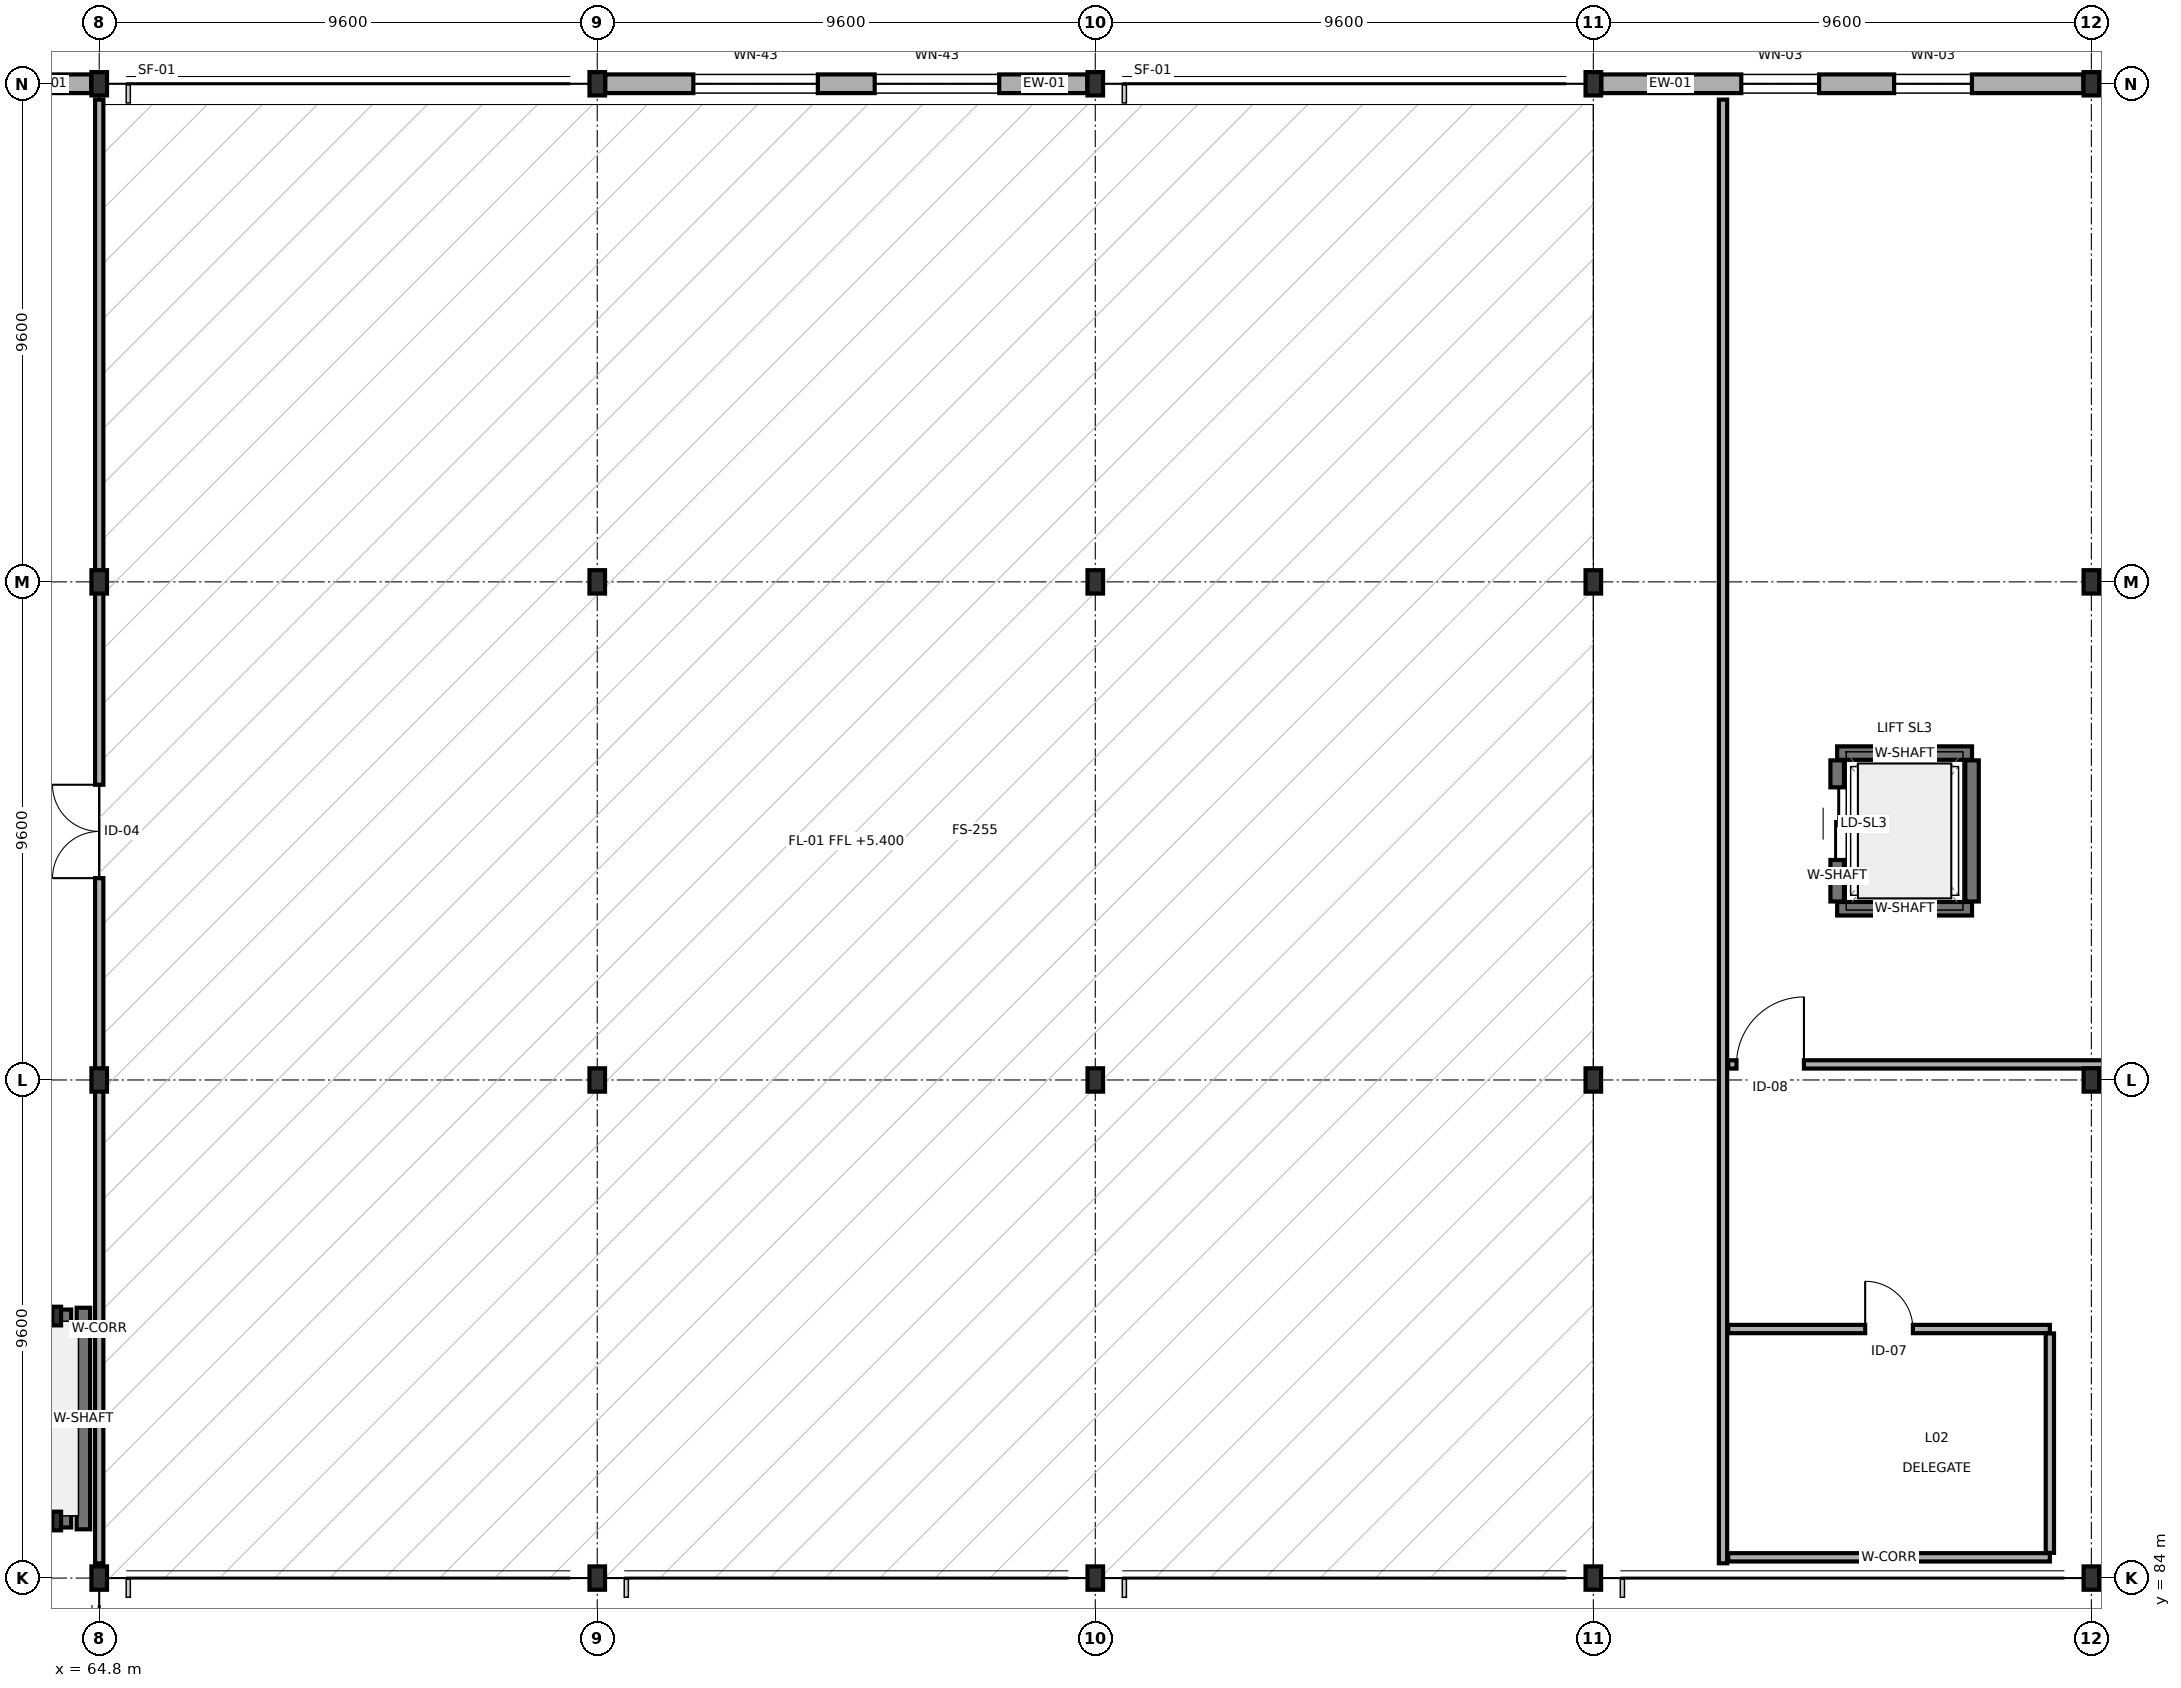
"""IFC4 building model, lengths in metres.
Left out: names, types, materials, properties, quantities, classifications, styles, units other than length and angle.
Written with IfcOpenShell. Run it as: python <this file> out.ifc"""

import sys

from ifc_helpers import new_model, si_unit, direction, frame, frame_2d, origin, origin_2d, place, context, subcontext, project, spatial, rectangle, i_section, extrude, element, fill, save


model = new_model("IFC4")
c1 = context("Model", 3, precision=1e-05, world=origin(), true_north=direction((0.0, 1.0)))
c2 = subcontext(c1, "Body", "Model", "MODEL_VIEW")
j1 = project(units=[si_unit("LENGTHUNIT", "METRE"), si_unit("PLANEANGLEUNIT", "RADIAN")], contexts=[c1])
p1 = place(None, origin())
s1 = spatial("IfcSite", under=j1, at=p1, CompositionType="ELEMENT")
p2 = place(p1, origin())
s2 = spatial("IfcBuilding", under=s1, at=p2, CompositionType="ELEMENT")
p3 = place(p2, frame((0.0, 0.0, 5.4)))
s3 = spatial("IfcBuildingStorey", under=s2, at=p3, CompositionType="ELEMENT", Elevation=5.4)
for number, where, z_axis, x_axis in (
    (1, (64.8, 84.0, 0.0), (0.0, 0.0, 1.0), (1.0, 0.0, 0.0)),
    (2, (64.8, 93.6, 0.0), (0.0, 0.0, 1.0), (1.0, 0.0, 0.0)),
    (3, (64.8, 103.2, 0.0), (0.0, 0.0, 1.0), (1.0, 0.0, 0.0)),
    (4, (64.8, 112.8, 0.0), (0.0, 0.0, 1.0), (1.0, 0.0, 0.0)),
    (5, (74.4, 84.0, 0.0), (0.0, 0.0, 1.0), (1.0, 0.0, 0.0)),
    (6, (74.4, 93.6, 0.0), (0.0, 0.0, 1.0), (1.0, 0.0, 0.0)),
    (7, (74.4, 103.2, 0.0), (0.0, 0.0, 1.0), (1.0, 0.0, 0.0)),
    (8, (74.4, 112.8, 0.0), (0.0, 0.0, 1.0), (1.0, 0.0, 0.0)),
    (9, (84.0, 84.0, 0.0), (0.0, 0.0, 1.0), (1.0, 0.0, 0.0)),
    (10, (84.0, 93.6, 0.0), (0.0, 0.0, 1.0), (1.0, 0.0, 0.0)),
    (11, (84.0, 103.2, 0.0), (0.0, 0.0, 1.0), (1.0, 0.0, 0.0)),
    (12, (84.0, 112.8, 0.0), (0.0, 0.0, 1.0), (1.0, 0.0, 0.0)),
    (13, (93.6, 84.0, 0.0), (0.0, 0.0, 1.0), (1.0, 0.0, 0.0)),
    (14, (93.6, 93.6, 0.0), (0.0, 0.0, 1.0), (1.0, 0.0, 0.0)),
    (15, (93.6, 103.2, 0.0), (0.0, 0.0, 1.0), (1.0, 0.0, 0.0)),
    (16, (93.6, 112.8, 0.0), (0.0, 0.0, 1.0), (1.0, 0.0, 0.0)),
    (17, (103.2, 84.0, 0.0), (0.0, 0.0, 1.0), (1.0, 0.0, 0.0)),
    (18, (103.2, 93.6, 0.0), (0.0, 0.0, 1.0), (1.0, 0.0, 0.0)),
    (19, (103.2, 103.2, 0.0), (0.0, 0.0, 1.0), (1.0, 0.0, 0.0)),
    (20, (103.2, 112.8, 0.0), (0.0, 0.0, 1.0), (1.0, 0.0, 0.0)),
):
    element("IfcColumn", number, at=place(p3, frame(where, z_axis=z_axis, x_axis=x_axis)), inside=s3, PredefinedType="COLUMN", context=c2, shape_type="SweptSolid", body=[
        extrude(i_section(OverallWidth=0.3, OverallDepth=0.45, WebThickness=0.014, FlangeThickness=0.026, FilletRadius=0.027, at=origin_2d()), origin(), (0.0, 0.0, 1.0), 4.5),
    ])
for number, where, z_axis, x_axis in (
    (21, (63.98, 85.1, 0.0), (0.0, 0.0, 1.0), (1.0, 0.0, 0.0)),
    (22, (63.98, 89.05, 0.0), (0.0, 0.0, 1.0), (1.0, 0.0, 0.0)),
):
    element("IfcColumn", number, at=place(p3, frame(where, z_axis=z_axis, x_axis=x_axis)), inside=s3, PredefinedType="PILASTER", context=c2, shape_type="SweptSolid", body=[
        extrude(i_section(OverallWidth=0.17, OverallDepth=0.36, WebThickness=0.008, FlangeThickness=0.013, FilletRadius=0.018, at=origin_2d()), origin(), (0.0, 0.0, 1.0), 4.5),
    ])
p4 = place(p3, frame((55.354, 112.8, 0.0), z_axis=(0.0, 0.0, 1.0), x_axis=(1.0, 0.0, 0.0)))
e23 = element("IfcWall", 23, at=p4, inside=s3, PredefinedType="SOLIDWALL", context=c2, shape_type="SweptSolid", body=[
    extrude(rectangle(XDim=9.292, YDim=0.36, at=frame_2d((4.646, 0.0))), origin(), (0.0, 0.0, 1.0), 3.685),
])
p5 = place(p4, frame((1.798, 0.0, 0.75)))
e24 = element("IfcOpeningElement", 24, at=p5, cuts=e23, PredefinedType="OPENING", context=c2, shape_type="SweptSolid", body=[
    extrude(rectangle(XDim=2.2, YDim=2.3, at=frame_2d((1.1, 1.15))), frame((0.0, 0.19, 0.0), z_axis=(0.0, -1.0, 0.0), x_axis=(1.0, 0.0, 0.0)), (0.0, 0.0, 1.0), 0.38),
])
p6 = place(p4, frame((5.294, 0.0, 0.75)))
e25 = element("IfcOpeningElement", 25, at=p6, cuts=e23, PredefinedType="OPENING", context=c2, shape_type="SweptSolid", body=[
    extrude(rectangle(XDim=2.2, YDim=2.3, at=frame_2d((1.1, 1.15))), frame((0.0, 0.19, 0.0), z_axis=(0.0, -1.0, 0.0), x_axis=(1.0, 0.0, 0.0)), (0.0, 0.0, 1.0), 0.38),
])
p7 = place(p3, frame((74.554, 112.8, 0.0), z_axis=(0.0, 0.0, 1.0), x_axis=(1.0, 0.0, 0.0)))
e26 = element("IfcWall", 26, at=p7, inside=s3, PredefinedType="SOLIDWALL", context=c2, shape_type="SweptSolid", body=[
    extrude(rectangle(XDim=9.292, YDim=0.36, at=frame_2d((4.646, 0.0))), origin(), (0.0, 0.0, 1.0), 3.685),
])
p8 = place(p7, frame((1.698, 0.0, 0.75)))
e27 = element("IfcOpeningElement", 27, at=p8, cuts=e26, PredefinedType="OPENING", context=c2, shape_type="SweptSolid", body=[
    extrude(rectangle(XDim=2.4, YDim=2.4, at=frame_2d((1.2, 1.2))), frame((0.0, 0.19, 0.0), z_axis=(0.0, -1.0, 0.0), x_axis=(1.0, 0.0, 0.0)), (0.0, 0.0, 1.0), 0.38),
])
p9 = place(p7, frame((5.194, 0.0, 0.75)))
e28 = element("IfcOpeningElement", 28, at=p9, cuts=e26, PredefinedType="OPENING", context=c2, shape_type="SweptSolid", body=[
    extrude(rectangle(XDim=2.4, YDim=2.4, at=frame_2d((1.2, 1.2))), frame((0.0, 0.19, 0.0), z_axis=(0.0, -1.0, 0.0), x_axis=(1.0, 0.0, 0.0)), (0.0, 0.0, 1.0), 0.38),
])
p10 = place(p3, frame((93.754, 112.8, 0.0), z_axis=(0.0, 0.0, 1.0), x_axis=(1.0, 0.0, 0.0)))
e29 = element("IfcWall", 29, at=p10, inside=s3, PredefinedType="SOLIDWALL", context=c2, shape_type="SweptSolid", body=[
    extrude(rectangle(XDim=9.292, YDim=0.36, at=frame_2d((4.646, 0.0))), origin(), (0.0, 0.0, 1.0), 3.685),
])
p11 = place(p10, frame((2.698, 0.0, 0.75)))
e30 = element("IfcOpeningElement", 30, at=p11, cuts=e29, PredefinedType="OPENING", context=c2, shape_type="SweptSolid", body=[
    extrude(rectangle(XDim=1.5, YDim=1.4, at=frame_2d((0.75, 0.7))), frame((0.0, 0.19, 0.0), z_axis=(0.0, -1.0, 0.0), x_axis=(1.0, 0.0, 0.0)), (0.0, 0.0, 1.0), 0.38),
])
p12 = place(p10, frame((5.644, 0.0, 0.75)))
e31 = element("IfcOpeningElement", 31, at=p12, cuts=e29, PredefinedType="OPENING", context=c2, shape_type="SweptSolid", body=[
    extrude(rectangle(XDim=1.5, YDim=1.4, at=frame_2d((0.75, 0.7))), frame((0.0, 0.19, 0.0), z_axis=(0.0, -1.0, 0.0), x_axis=(1.0, 0.0, 0.0)), (0.0, 0.0, 1.0), 0.38),
])
p13 = place(p3, frame((64.495, 84.94, 0.0), z_axis=(0.0, 0.0, 1.0), x_axis=(0.0, 1.0, 0.0)))
e32 = element("IfcWall", 32, at=p13, inside=s3, PredefinedType="SHEAR", context=c2, shape_type="SweptSolid", body=[
    extrude(rectangle(XDim=4.27, YDim=0.26, at=frame_2d((2.135, 0.0))), origin(), (0.0, 0.0, 1.0), 4.24),
])
p14 = place(p3, frame((55.74, 85.105, 0.0), z_axis=(0.0, 0.0, 1.0), x_axis=(1.0, 0.0, 0.0)))
e33 = element("IfcWall", 33, at=p14, inside=s3, PredefinedType="SHEAR", context=c2, shape_type="SweptSolid", body=[
    extrude(rectangle(XDim=8.52, YDim=0.26, at=frame_2d((4.26, 0.0))), origin(), (0.0, 0.0, 1.0), 4.24),
])
p15 = place(p14, frame((0.45, 0.0, 0.0)))
e34 = element("IfcOpeningElement", 34, at=p15, cuts=e33, PredefinedType="OPENING", context=c2, shape_type="SweptSolid", body=[
    extrude(rectangle(XDim=1.1, YDim=2.2, at=frame_2d((0.55, 1.1))), frame((0.0, 0.14, 0.0), z_axis=(0.0, -1.0, 0.0), x_axis=(1.0, 0.0, 0.0)), (0.0, 0.0, 1.0), 0.28),
])
p16 = place(p3, frame((55.74, 89.045, 0.0), z_axis=(0.0, 0.0, 1.0), x_axis=(1.0, 0.0, 0.0)))
e35 = element("IfcWall", 35, at=p16, inside=s3, PredefinedType="SHEAR", context=c2, shape_type="SweptSolid", body=[
    extrude(rectangle(XDim=8.52, YDim=0.26, at=frame_2d((4.26, 0.0))), origin(), (0.0, 0.0, 1.0), 4.24),
])
for number, where, z_axis, x_axis in (
    (36, (98.3, 96.9, 0.0), (0.0, 0.0, 1.0), (1.0, 0.0, 0.0)),
    (37, (98.3, 99.9, 0.0), (0.0, 0.0, 1.0), (1.0, 0.0, 0.0)),
):
    element("IfcWall", number, at=place(p3, frame(where, z_axis=z_axis, x_axis=x_axis)), inside=s3, PredefinedType="SHEAR", context=c2, shape_type="SweptSolid", body=[
        extrude(rectangle(XDim=2.6, YDim=0.26, at=frame_2d((1.3, 0.0))), origin(), (0.0, 0.0, 1.0), 4.24),
    ])
p17 = place(p3, frame((98.3, 97.04, 0.0), z_axis=(0.0, 0.0, 1.0), x_axis=(0.0, 1.0, 0.0)))
e38 = element("IfcWall", 38, at=p17, inside=s3, PredefinedType="SHEAR", context=c2, shape_type="SweptSolid", body=[
    extrude(rectangle(XDim=2.72, YDim=0.26, at=frame_2d((1.36, 0.0))), origin(), (0.0, 0.0, 1.0), 4.24),
])
p18 = place(p17, frame((0.8, 0.0, 0.0)))
e39 = element("IfcOpeningElement", 39, at=p18, cuts=e38, PredefinedType="OPENING", context=c2, shape_type="SweptSolid", body=[
    extrude(rectangle(XDim=1.4, YDim=2.3, at=frame_2d((0.7, 1.15))), frame((0.0, 0.14, 0.0), z_axis=(0.0, -1.0, 0.0), x_axis=(1.0, 0.0, 0.0)), (0.0, 0.0, 1.0), 0.28),
])
p19 = place(p3, frame((100.9, 97.04, 0.0), z_axis=(0.0, 0.0, 1.0), x_axis=(0.0, 1.0, 0.0)))
e40 = element("IfcWall", 40, at=p19, inside=s3, PredefinedType="SHEAR", context=c2, shape_type="SweptSolid", body=[
    extrude(rectangle(XDim=2.72, YDim=0.26, at=frame_2d((1.36, 0.0))), origin(), (0.0, 0.0, 1.0), 4.24),
])
p20 = place(p3, frame((64.8, 84.285, 0.0), z_axis=(0.0, 0.0, 1.0), x_axis=(0.0, 1.0, 0.0)))
e41 = element("IfcWall", 41, at=p20, inside=s3, PredefinedType="PARTITIONING", context=c2, shape_type="SweptSolid", body=[
    extrude(rectangle(XDim=28.21, YDim=0.16, at=frame_2d((14.105, 0.0))), origin(), (0.0, 0.0, 1.0), 3.685),
])
p21 = place(p20, frame((13.205, 0.0, 0.0)))
e42 = element("IfcOpeningElement", 42, at=p21, cuts=e41, PredefinedType="OPENING", context=c2, shape_type="SweptSolid", body=[
    extrude(rectangle(XDim=1.8, YDim=2.3, at=frame_2d((0.9, 1.15))), frame((0.0, 0.09, 0.0), z_axis=(0.0, -1.0, 0.0), x_axis=(1.0, 0.0, 0.0)), (0.0, 0.0, 1.0), 0.18),
])
p22 = place(p3, frame((96.1, 84.285, 0.0), z_axis=(0.0, 0.0, 1.0), x_axis=(0.0, 1.0, 0.0)))
e43 = element("IfcWall", 43, at=p22, inside=s3, PredefinedType="PARTITIONING", context=c2, shape_type="SweptSolid", body=[
    extrude(rectangle(XDim=28.21, YDim=0.16, at=frame_2d((14.105, 0.0))), origin(), (0.0, 0.0, 1.0), 3.685),
])
p23 = place(p3, frame((96.2, 93.9, 0.0), z_axis=(0.0, 0.0, 1.0), x_axis=(1.0, 0.0, 0.0)))
e44 = element("IfcWall", 44, at=p23, inside=s3, PredefinedType="PARTITIONING", context=c2, shape_type="SweptSolid", body=[
    extrude(rectangle(XDim=21.2, YDim=0.16, at=frame_2d((10.6, 0.0))), origin(), (0.0, 0.0, 1.0), 3.685),
])
p24 = place(p23, frame((0.16, 0.0, 0.0)))
e45 = element("IfcOpeningElement", 45, at=p24, cuts=e44, PredefinedType="OPENING", context=c2, shape_type="SweptSolid", body=[
    extrude(rectangle(XDim=1.3, YDim=2.2, at=frame_2d((0.65, 1.1))), frame((0.0, 0.09, 0.0), z_axis=(0.0, -1.0, 0.0), x_axis=(1.0, 0.0, 0.0)), (0.0, 0.0, 1.0), 0.18),
])
p25 = place(p3, frame((96.2, 84.4, 0.0), z_axis=(0.0, 0.0, 1.0), x_axis=(1.0, 0.0, 0.0)))
e46 = element("IfcWall", 46, at=p25, inside=s3, PredefinedType="PARTITIONING", context=c2, shape_type="SweptSolid", body=[
    extrude(rectangle(XDim=6.2, YDim=0.16, at=frame_2d((3.1, 0.0))), origin(), (0.0, 0.0, 1.0), 4.24),
])
p26 = place(p3, frame((96.2, 88.8, 0.0), z_axis=(0.0, 0.0, 1.0), x_axis=(1.0, 0.0, 0.0)))
e47 = element("IfcWall", 47, at=p26, inside=s3, PredefinedType="PARTITIONING", context=c2, shape_type="SweptSolid", body=[
    extrude(rectangle(XDim=6.2, YDim=0.16, at=frame_2d((3.1, 0.0))), origin(), (0.0, 0.0, 1.0), 4.24),
])
p27 = place(p26, frame((2.64, 0.0, 0.0)))
e48 = element("IfcOpeningElement", 48, at=p27, cuts=e47, PredefinedType="OPENING", context=c2, shape_type="SweptSolid", body=[
    extrude(rectangle(XDim=0.92, YDim=2.1, at=frame_2d((0.46, 1.05))), frame((0.0, 0.09, 0.0), z_axis=(0.0, -1.0, 0.0), x_axis=(1.0, 0.0, 0.0)), (0.0, 0.0, 1.0), 0.18),
])
p28 = place(p3, frame((102.4, 84.485, 0.0), z_axis=(0.0, 0.0, 1.0), x_axis=(0.0, 1.0, 0.0)))
e49 = element("IfcWall", 49, at=p28, inside=s3, PredefinedType="PARTITIONING", context=c2, shape_type="SweptSolid", body=[
    extrude(rectangle(XDim=4.23, YDim=0.16, at=frame_2d((2.115, 0.0))), origin(), (0.0, 0.0, 1.0), 4.24),
])
p29 = place(p8, origin())
e50 = element("IfcWindow", 50, at=p29, inside=s3, PartitioningType="SINGLE_PANEL", PredefinedType="WINDOW", context=c2, shape_type="SweptSolid", body=[
    extrude(rectangle(XDim=2.4, YDim=2.4, at=frame_2d((1.2, 1.2))), frame((0.0, 0.03, 0.0), z_axis=(0.0, -1.0, 0.0), x_axis=(1.0, 0.0, 0.0)), (0.0, 0.0, 1.0), 0.06),
])
fill(e27, e50)
p30 = place(p9, origin())
e51 = element("IfcWindow", 51, at=p30, inside=s3, PartitioningType="SINGLE_PANEL", PredefinedType="WINDOW", context=c2, shape_type="SweptSolid", body=[
    extrude(rectangle(XDim=2.4, YDim=2.4, at=frame_2d((1.2, 1.2))), frame((0.0, 0.03, 0.0), z_axis=(0.0, -1.0, 0.0), x_axis=(1.0, 0.0, 0.0)), (0.0, 0.0, 1.0), 0.06),
])
fill(e28, e51)
p31 = place(p11, origin())
e52 = element("IfcWindow", 52, at=p31, inside=s3, PartitioningType="SINGLE_PANEL", PredefinedType="WINDOW", context=c2, shape_type="SweptSolid", body=[
    extrude(rectangle(XDim=1.5, YDim=1.4, at=frame_2d((0.75, 0.7))), frame((0.0, 0.03, 0.0), z_axis=(0.0, -1.0, 0.0), x_axis=(1.0, 0.0, 0.0)), (0.0, 0.0, 1.0), 0.06),
])
fill(e30, e52)
p32 = place(p12, origin())
e53 = element("IfcWindow", 53, at=p32, inside=s3, PartitioningType="SINGLE_PANEL", PredefinedType="WINDOW", context=c2, shape_type="SweptSolid", body=[
    extrude(rectangle(XDim=1.5, YDim=1.4, at=frame_2d((0.75, 0.7))), frame((0.0, 0.03, 0.0), z_axis=(0.0, -1.0, 0.0), x_axis=(1.0, 0.0, 0.0)), (0.0, 0.0, 1.0), 0.06),
])
fill(e31, e53)
p33 = place(p18, origin())
e54 = element("IfcDoor", 54, at=p33, inside=s3, OperationType="SLIDING_TO_LEFT", PredefinedType="DOOR", context=c2, shape_type="SweptSolid", body=[
    extrude(rectangle(XDim=1.4, YDim=2.3, at=frame_2d((0.7, 1.15))), frame((0.0, 0.025, 0.0), z_axis=(0.0, -1.0, 0.0), x_axis=(1.0, 0.0, 0.0)), (0.0, 0.0, 1.0), 0.05),
])
fill(e39, e54)
p34 = place(p21, origin())
e55 = element("IfcDoor", 55, at=p34, inside=s3, OperationType="DOUBLE_DOOR_SINGLE_SWING", PredefinedType="DOOR", context=c2, shape_type="SweptSolid", body=[
    extrude(rectangle(XDim=1.8, YDim=2.3, at=frame_2d((0.9, 1.15))), frame((0.0, 0.025, 0.0), z_axis=(0.0, -1.0, 0.0), x_axis=(1.0, 0.0, 0.0)), (0.0, 0.0, 1.0), 0.05),
])
fill(e42, e55)
p35 = place(p24, origin())
e56 = element("IfcDoor", 56, at=p35, inside=s3, OperationType="SINGLE_SWING_RIGHT", PredefinedType="DOOR", context=c2, shape_type="SweptSolid", body=[
    extrude(rectangle(XDim=1.3, YDim=2.2, at=frame_2d((0.65, 1.1))), frame((0.0, 0.025, 0.0), z_axis=(0.0, -1.0, 0.0), x_axis=(1.0, 0.0, 0.0)), (0.0, 0.0, 1.0), 0.05),
])
fill(e45, e56)
p36 = place(p27, origin())
e57 = element("IfcDoor", 57, at=p36, inside=s3, OperationType="SINGLE_SWING_LEFT", PredefinedType="DOOR", context=c2, shape_type="SweptSolid", body=[
    extrude(rectangle(XDim=0.92, YDim=2.1, at=frame_2d((0.46, 1.05))), frame((0.0, 0.025, 0.0), z_axis=(0.0, -1.0, 0.0), x_axis=(1.0, 0.0, 0.0)), (0.0, 0.0, 1.0), 0.05),
])
fill(e48, e57)
save(model, sys.argv[1])
